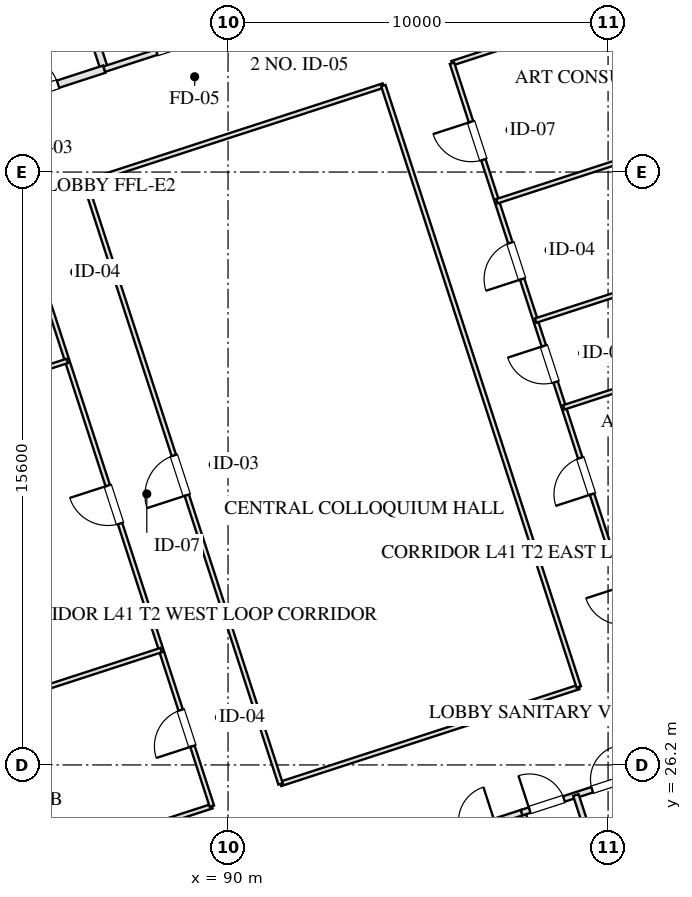
"""IFC4 building model, lengths in metres.
Left out: names, types, materials, properties, quantities, classifications, styles, units other than length and angle.
Written with IfcOpenShell. Run it as: python <this file> out.ifc"""

import sys

from ifc_helpers import new_model, si_unit, direction, frame, frame_2d, origin, place, context, subcontext, project, spatial, rectangle, extrude, element, fill, save


model = new_model("IFC4")
c1 = context("Model", 3, precision=1e-05, world=origin(), true_north=direction((0.0, 1.0)))
c2 = subcontext(c1, "Body", "Model", "MODEL_VIEW")
j1 = project(units=[si_unit("LENGTHUNIT", "METRE"), si_unit("PLANEANGLEUNIT", "RADIAN")], contexts=[c1])
p1 = place(None, origin())
s1 = spatial("IfcSite", under=j1, at=p1, CompositionType="ELEMENT")
p2 = place(p1, origin())
s2 = spatial("IfcBuilding", under=s1, at=p2, CompositionType="ELEMENT")
p3 = place(p2, frame((0.0, 0.0, 156.4)))
s3 = spatial("IfcBuildingStorey", under=s2, at=p3, CompositionType="ELEMENT", Elevation=156.4)
p4 = place(p3, frame((98.224, 59.173, 0.0), z_axis=(0.0, 0.0, 1.0), x_axis=(0.309014228706, -0.951057414911, 0.0)))
e1 = element("IfcWall", 1, at=p4, inside=s3, PredefinedType="SOLIDWALL", context=c2, shape_type="SweptSolid", body=[
    extrude(rectangle(XDim=42.8, YDim=0.4, at=frame_2d((21.4, 0.0))), origin(), (0.0, 0.0, 1.0), 2.61),
])
p5 = place(p4, frame((17.999, 0.0, 0.0)))
e2 = element("IfcOpeningElement", 2, at=p5, cuts=e1, PredefinedType="OPENING", context=c2, shape_type="SweptSolid", body=[
    extrude(rectangle(XDim=1.1, YDim=2.15, at=frame_2d((0.55, 1.075))), frame((0.0, 0.21, 0.0), z_axis=(0.0, -1.0, 0.0), x_axis=(1.0, 0.0, 0.0)), (0.0, 0.0, 1.0), 0.42),
])
p6 = place(p3, frame((97.727, 24.944, 0.0), z_axis=(0.0, 0.0, 1.0), x_axis=(0.309016001439, -0.951056838919, 0.0)))
e3 = element("IfcWall", 3, at=p6, inside=s3, PredefinedType="PARTITIONING", context=c2, shape_type="SweptSolid", body=[
    extrude(rectangle(XDim=8.43, YDim=0.2, at=frame_2d((4.215, 0.0))), origin(), (0.0, 0.0, 1.0), 3.175),
])
p7 = place(p3, frame((93.542, 23.585, 0.0), z_axis=(0.0, 0.0, 1.0), x_axis=(0.951063829732, 0.308994485023, 0.0)))
e4 = element("IfcWall", 4, at=p7, inside=s3, PredefinedType="PARTITIONING", context=c2, shape_type="SweptSolid", body=[
    extrude(rectangle(XDim=4.4, YDim=0.15, at=frame_2d((2.2, 0.0))), origin(), (0.0, 0.0, 1.0), 3.175),
])
p8 = place(p7, frame((0.55, 0.0, 0.0)))
e5 = element("IfcOpeningElement", 5, at=p8, cuts=e4, PredefinedType="OPENING", context=c2, shape_type="SweptSolid", body=[
    extrude(rectangle(XDim=0.95, YDim=2.05, at=frame_2d((0.475, 1.025))), frame((0.0, 0.085, 0.0), z_axis=(0.0, -1.0, 0.0), x_axis=(1.0, 0.0, 0.0)), (0.0, 0.0, 1.0), 0.17),
])
p9 = place(p7, frame((2.7, 0.0, 0.0)))
e6 = element("IfcOpeningElement", 6, at=p9, cuts=e4, PredefinedType="OPENING", context=c2, shape_type="SweptSolid", body=[
    extrude(rectangle(XDim=0.95, YDim=2.05, at=frame_2d((0.475, 1.025))), frame((0.0, 0.085, 0.0), z_axis=(0.0, -1.0, 0.0), x_axis=(1.0, 0.0, 0.0)), (0.0, 0.0, 1.0), 0.17),
])
p10 = place(p3, frame((97.727, 24.944, 0.0), z_axis=(0.0, 0.0, 1.0), x_axis=(0.951036872128, 0.309077446369, 0.0)))
e7 = element("IfcWall", 7, at=p10, inside=s3, PredefinedType="PARTITIONING", context=c2, shape_type="SweptSolid", body=[
    extrude(rectangle(XDim=3.2, YDim=0.15, at=frame_2d((1.6, 0.0))), origin(), (0.0, 0.0, 1.0), 3.175),
])
p11 = place(p10, frame((0.22, 0.0, 0.0)))
e8 = element("IfcOpeningElement", 8, at=p11, cuts=e7, PredefinedType="OPENING", context=c2, shape_type="SweptSolid", body=[
    extrude(rectangle(XDim=0.95, YDim=2.05, at=frame_2d((0.475, 1.025))), frame((0.0, 0.085, 0.0), z_axis=(0.0, -1.0, 0.0), x_axis=(1.0, 0.0, 0.0)), (0.0, 0.0, 1.0), 0.17),
])
p12 = place(p10, frame((1.95, 0.0, 0.0)))
e9 = element("IfcOpeningElement", 9, at=p12, cuts=e7, PredefinedType="OPENING", context=c2, shape_type="SweptSolid", body=[
    extrude(rectangle(XDim=0.9, YDim=2.05, at=frame_2d((0.45, 1.025))), frame((0.0, 0.085, 0.0), z_axis=(0.0, -1.0, 0.0), x_axis=(1.0, 0.0, 0.0)), (0.0, 0.0, 1.0), 0.17),
])
p13 = place(p3, frame((99.153, 25.408, 0.0), z_axis=(0.0, 0.0, 1.0), x_axis=(0.309016001439, -0.951056838919, 0.0)))
e10 = element("IfcWall", 10, at=p13, inside=s3, PredefinedType="PARTITIONING", context=c2, shape_type="SweptSolid", body=[
    extrude(rectangle(XDim=8.43, YDim=0.15, at=frame_2d((4.215, 0.0))), origin(), (0.0, 0.0, 1.0), 3.175),
])
p14 = place(p13, frame((2.55, 0.0, 0.0)))
e11 = element("IfcOpeningElement", 11, at=p14, cuts=e10, PredefinedType="OPENING", context=c2, shape_type="SweptSolid", body=[
    extrude(rectangle(XDim=0.95, YDim=2.05, at=frame_2d((0.475, 1.025))), frame((0.0, 0.085, 0.0), z_axis=(0.0, -1.0, 0.0), x_axis=(1.0, 0.0, 0.0)), (0.0, 0.0, 1.0), 0.17),
])
p15 = place(p13, frame((5.6, 0.0, 0.0)))
e12 = element("IfcOpeningElement", 12, at=p15, cuts=e10, PredefinedType="OPENING", context=c2, shape_type="SweptSolid", body=[
    extrude(rectangle(XDim=0.9, YDim=2.05, at=frame_2d((0.45, 1.025))), frame((0.0, 0.085, 0.0), z_axis=(0.0, -1.0, 0.0), x_axis=(1.0, 0.0, 0.0)), (0.0, 0.0, 1.0), 0.17),
])
p16 = place(p3, frame((86.743, 44.508, 0.0), z_axis=(0.0, 0.0, 1.0), x_axis=(-0.309016001439, 0.951056838919, 0.0)))
e13 = element("IfcWall", 13, at=p16, inside=s3, PredefinedType="PARTITIONING", context=c2, shape_type="SweptSolid", body=[
    extrude(rectangle(XDim=8.43, YDim=0.2, at=frame_2d((4.215, 0.0))), origin(), (0.0, 0.0, 1.0), 3.175),
])
p17 = place(p3, frame((83.101, 43.324, 0.0), z_axis=(0.0, 0.0, 1.0), x_axis=(0.951052804469, 0.309028417967, 0.0)))
e14 = element("IfcWall", 14, at=p17, inside=s3, PredefinedType="PARTITIONING", context=c2, shape_type="SweptSolid", body=[
    extrude(rectangle(XDim=3.83, YDim=0.2, at=frame_2d((1.915, 0.0))), origin(), (0.0, 0.0, 1.0), 3.175),
])
p18 = place(p17, frame((1.35, 0.0, 0.0)))
e15 = element("IfcOpeningElement", 15, at=p18, cuts=e14, PredefinedType="OPENING", context=c2, shape_type="SweptSolid", body=[
    extrude(rectangle(XDim=1.2, YDim=2.05, at=frame_2d((0.6, 1.025))), frame((0.0, 0.11, 0.0), z_axis=(0.0, -1.0, 0.0), x_axis=(1.0, 0.0, 0.0)), (0.0, 0.0, 1.0), 0.22),
])
p19 = place(p3, frame((86.743, 44.508, 0.0), z_axis=(0.0, 0.0, 1.0), x_axis=(0.951063829732, 0.308994485023, 0.0)))
e16 = element("IfcWall", 16, at=p19, inside=s3, PredefinedType="PARTITIONING", context=c2, shape_type="SweptSolid", body=[
    extrude(rectangle(XDim=4.4, YDim=0.15, at=frame_2d((2.2, 0.0))), origin(), (0.0, 0.0, 1.0), 3.175),
])
p20 = place(p19, frame((1.45, 0.0, 0.0)))
e17 = element("IfcOpeningElement", 17, at=p20, cuts=e16, PredefinedType="OPENING", context=c2, shape_type="SweptSolid", body=[
    extrude(rectangle(XDim=1.5, YDim=2.05, at=frame_2d((0.75, 1.025))), frame((0.0, 0.085, 0.0), z_axis=(0.0, -1.0, 0.0), x_axis=(1.0, 0.0, 0.0)), (0.0, 0.0, 1.0), 0.17),
])
p21 = place(p3, frame((77.925, 21.328, 0.0), z_axis=(0.0, 0.0, 1.0), x_axis=(0.95105749975, 0.309013967595, 0.0)))
e18 = element("IfcWall", 18, at=p21, inside=s3, PredefinedType="PARTITIONING", context=c2, shape_type="SweptSolid", body=[
    extrude(rectangle(XDim=12.25, YDim=0.12, at=frame_2d((6.125, 0.0))), origin(), (0.0, 0.0, 1.0), 3.175),
])
p22 = place(p3, frame((91.382, 25.701, 0.0), z_axis=(0.0, 0.0, 1.0), x_axis=(0.951061683147, 0.309001091988, 0.0)))
e19 = element("IfcWall", 19, at=p22, inside=s3, PredefinedType="PARTITIONING", context=c2, shape_type="SweptSolid", body=[
    extrude(rectangle(XDim=8.25, YDim=0.12, at=frame_2d((4.125, 0.0))), origin(), (0.0, 0.0, 1.0), 3.175),
])
p23 = place(p3, frame((86.24, 41.527, 0.0), z_axis=(0.0, 0.0, 1.0), x_axis=(0.951058857521, 0.309009788731, 0.0)))
e20 = element("IfcWall", 20, at=p23, inside=s3, PredefinedType="PARTITIONING", context=c2, shape_type="SweptSolid", body=[
    extrude(rectangle(XDim=8.25, YDim=0.12, at=frame_2d((4.125, 0.0))), origin(), (0.0, 0.0, 1.0), 3.175),
])
p24 = place(p3, frame((95.893, 44.663, 0.0), z_axis=(0.0, 0.0, 1.0), x_axis=(0.951059735424, 0.30900708674, 0.0)))
e21 = element("IfcWall", 21, at=p24, inside=s3, PredefinedType="PARTITIONING", context=c2, shape_type="SweptSolid", body=[
    extrude(rectangle(XDim=6.5, YDim=0.12, at=frame_2d((3.25, 0.0))), origin(), (0.0, 0.0, 1.0), 3.175),
])
p25 = place(p3, frame((89.575, 25.114, 0.0), z_axis=(0.0, 0.0, 1.0), x_axis=(-0.30901773025, 0.951056277195, 0.0)))
e22 = element("IfcWall", 22, at=p25, inside=s3, PredefinedType="PARTITIONING", context=c2, shape_type="SweptSolid", body=[
    extrude(rectangle(XDim=16.64, YDim=0.12, at=frame_2d((8.32, 0.0))), origin(), (0.0, 0.0, 1.0), 3.175),
])
p26 = place(p25, frame((1.66, 0.0, 0.0)))
e23 = element("IfcOpeningElement", 23, at=p26, cuts=e22, PredefinedType="OPENING", context=c2, shape_type="SweptSolid", body=[
    extrude(rectangle(XDim=1.0, YDim=2.05, at=frame_2d((0.5, 1.025))), frame((0.0, 0.07, 0.0), z_axis=(0.0, -1.0, 0.0), x_axis=(1.0, 0.0, 0.0)), (0.0, 0.0, 1.0), 0.14),
])
p27 = place(p25, frame((7.82, 0.0, 0.0)))
e24 = element("IfcOpeningElement", 24, at=p27, cuts=e22, PredefinedType="OPENING", context=c2, shape_type="SweptSolid", body=[
    extrude(rectangle(XDim=1.05, YDim=2.05, at=frame_2d((0.525, 1.025))), frame((0.0, 0.07, 0.0), z_axis=(0.0, -1.0, 0.0), x_axis=(1.0, 0.0, 0.0)), (0.0, 0.0, 1.0), 0.14),
])
p28 = place(p25, frame((13.98, 0.0, 0.0)))
e25 = element("IfcOpeningElement", 25, at=p28, cuts=e22, PredefinedType="OPENING", context=c2, shape_type="SweptSolid", body=[
    extrude(rectangle(XDim=1.0, YDim=2.05, at=frame_2d((0.5, 1.025))), frame((0.0, 0.07, 0.0), z_axis=(0.0, -1.0, 0.0), x_axis=(1.0, 0.0, 0.0)), (0.0, 0.0, 1.0), 0.14),
])
p29 = place(p3, frame((91.382, 25.701, 0.0), z_axis=(0.0, 0.0, 1.0), x_axis=(-0.309004459387, 0.951060589068, 0.0)))
e26 = element("IfcWall", 26, at=p29, inside=s3, PredefinedType="PARTITIONING", context=c2, shape_type="SweptSolid", body=[
    extrude(rectangle(XDim=16.64, YDim=0.12, at=frame_2d((8.32, 0.0))), origin(), (0.0, 0.0, 1.0), 3.175),
])
p30 = place(p29, frame((7.987, 0.0, 0.0)))
e27 = element("IfcOpeningElement", 27, at=p30, cuts=e26, PredefinedType="OPENING", context=c2, shape_type="SweptSolid", body=[
    extrude(rectangle(XDim=1.1, YDim=2.05, at=frame_2d((0.55, 1.025))), frame((0.0, 0.07, 0.0), z_axis=(0.0, -1.0, 0.0), x_axis=(1.0, 0.0, 0.0)), (0.0, 0.0, 1.0), 0.14),
])
p31 = place(p3, frame((99.229, 28.25, 0.0), z_axis=(0.0, 0.0, 1.0), x_axis=(-0.30901773025, 0.951056277195, 0.0)))
e28 = element("IfcWall", 28, at=p31, inside=s3, PredefinedType="PARTITIONING", context=c2, shape_type="SweptSolid", body=[
    extrude(rectangle(XDim=16.64, YDim=0.12, at=frame_2d((8.32, 0.0))), origin(), (0.0, 0.0, 1.0), 3.175),
])
p32 = place(p3, frame((101.035, 28.837, 0.0), z_axis=(0.0, 0.0, 1.0), x_axis=(-0.30901773025, 0.951056277195, 0.0)))
e29 = element("IfcWall", 29, at=p32, inside=s3, PredefinedType="PARTITIONING", context=c2, shape_type="SweptSolid", body=[
    extrude(rectangle(XDim=16.64, YDim=0.12, at=frame_2d((8.32, 0.0))), origin(), (0.0, 0.0, 1.0), 3.175),
])
p33 = place(p32, frame((1.16, 0.0, 0.0)))
e30 = element("IfcOpeningElement", 30, at=p33, cuts=e29, PredefinedType="OPENING", context=c2, shape_type="SweptSolid", body=[
    extrude(rectangle(XDim=1.0, YDim=2.05, at=frame_2d((0.5, 1.025))), frame((0.0, 0.07, 0.0), z_axis=(0.0, -1.0, 0.0), x_axis=(1.0, 0.0, 0.0)), (0.0, 0.0, 1.0), 0.14),
])
p34 = place(p32, frame((4.72, 0.0, 0.0)))
e31 = element("IfcOpeningElement", 31, at=p34, cuts=e29, PredefinedType="OPENING", context=c2, shape_type="SweptSolid", body=[
    extrude(rectangle(XDim=1.0, YDim=2.05, at=frame_2d((0.5, 1.025))), frame((0.0, 0.07, 0.0), z_axis=(0.0, -1.0, 0.0), x_axis=(1.0, 0.0, 0.0)), (0.0, 0.0, 1.0), 0.14),
])
p35 = place(p32, frame((7.82, 0.0, 0.0)))
e32 = element("IfcOpeningElement", 32, at=p35, cuts=e29, PredefinedType="OPENING", context=c2, shape_type="SweptSolid", body=[
    extrude(rectangle(XDim=1.0, YDim=2.05, at=frame_2d((0.5, 1.025))), frame((0.0, 0.07, 0.0), z_axis=(0.0, -1.0, 0.0), x_axis=(1.0, 0.0, 0.0)), (0.0, 0.0, 1.0), 0.14),
])
p36 = place(p32, frame((10.671, 0.0, 0.0)))
e33 = element("IfcOpeningElement", 33, at=p36, cuts=e29, PredefinedType="OPENING", context=c2, shape_type="SweptSolid", body=[
    extrude(rectangle(XDim=1.0, YDim=2.05, at=frame_2d((0.5, 1.025))), frame((0.0, 0.07, 0.0), z_axis=(0.0, -1.0, 0.0), x_axis=(1.0, 0.0, 0.0)), (0.0, 0.0, 1.0), 0.14),
])
p37 = place(p32, frame((13.971, 0.0, 0.0)))
e34 = element("IfcOpeningElement", 34, at=p37, cuts=e29, PredefinedType="OPENING", context=c2, shape_type="SweptSolid", body=[
    extrude(rectangle(XDim=1.05, YDim=2.05, at=frame_2d((0.525, 1.025))), frame((0.0, 0.07, 0.0), z_axis=(0.0, -1.0, 0.0), x_axis=(1.0, 0.0, 0.0)), (0.0, 0.0, 1.0), 0.14),
])
for number, where, z_axis, x_axis in (
    (35, (76.59, 25.437, 0.0), (0.0, 0.0, 1.0), (0.951, 0.309, 0.0)),
    (36, (74.118, 33.045, 0.0), (0.0, 0.0, 1.0), (0.951, 0.309, 0.0)),
):
    element("IfcWall", number, at=place(p3, frame(where, z_axis=z_axis, x_axis=x_axis)), inside=s3, PredefinedType="PARTITIONING", context=c2, shape_type="SweptSolid", body=[
        extrude(rectangle(XDim=12.25, YDim=0.12, at=frame_2d((6.125, 0.0))), origin(), (0.0, 0.0, 1.0), 3.175),
    ])
for number, where, z_axis, x_axis in (
    (37, (100.01, 31.995, 0.0), (0.0, 0.0, 1.0), (0.951, 0.309, 0.0)),
    (38, (98.835, 35.609, 0.0), (0.0, 0.0, 1.0), (0.951, 0.309, 0.0)),
    (39, (98.094, 37.892, 0.0), (0.0, 0.0, 1.0), (0.951, 0.309, 0.0)),
    (40, (97.073, 41.031, 0.0), (0.0, 0.0, 1.0), (0.951, 0.309, 0.0)),
):
    element("IfcWall", number, at=place(p3, frame(where, z_axis=z_axis, x_axis=x_axis)), inside=s3, PredefinedType="PARTITIONING", context=c2, shape_type="SweptSolid", body=[
        extrude(rectangle(XDim=6.5, YDim=0.12, at=frame_2d((3.25, 0.0))), origin(), (0.0, 0.0, 1.0), 3.175),
    ])
p38 = place(p11, origin())
e41 = element("IfcDoor", 41, at=p38, inside=s3, OperationType="SINGLE_SWING_LEFT", PredefinedType="DOOR", context=c2, shape_type="SweptSolid", body=[
    extrude(rectangle(XDim=0.95, YDim=2.05, at=frame_2d((0.475, 1.025))), frame((0.0, 0.025, 0.0), z_axis=(0.0, -1.0, 0.0), x_axis=(1.0, 0.0, 0.0)), (0.0, 0.0, 1.0), 0.05),
])
fill(e8, e41)
p39 = place(p12, origin())
e42 = element("IfcDoor", 42, at=p39, inside=s3, OperationType="SINGLE_SWING_RIGHT", PredefinedType="DOOR", context=c2, shape_type="SweptSolid", body=[
    extrude(rectangle(XDim=0.9, YDim=2.05, at=frame_2d((0.45, 1.025))), frame((0.0, 0.025, 0.0), z_axis=(0.0, -1.0, 0.0), x_axis=(1.0, 0.0, 0.0)), (0.0, 0.0, 1.0), 0.05),
])
fill(e9, e42)
p40 = place(p18, origin())
e43 = element("IfcDoor", 43, at=p40, inside=s3, OperationType="SINGLE_SWING_LEFT", PredefinedType="DOOR", context=c2, shape_type="SweptSolid", body=[
    extrude(rectangle(XDim=1.2, YDim=2.05, at=frame_2d((0.6, 1.025))), frame((0.0, 0.025, 0.0), z_axis=(0.0, -1.0, 0.0), x_axis=(1.0, 0.0, 0.0)), (0.0, 0.0, 1.0), 0.05),
])
fill(e15, e43)
p41 = place(p20, origin())
e44 = element("IfcDoor", 44, at=p41, inside=s3, OperationType="SINGLE_SWING_LEFT", PredefinedType="DOOR", context=c2, shape_type="SweptSolid", body=[
    extrude(rectangle(XDim=1.5, YDim=2.05, at=frame_2d((0.75, 1.025))), frame((0.0, 0.025, 0.0), z_axis=(0.0, -1.0, 0.0), x_axis=(1.0, 0.0, 0.0)), (0.0, 0.0, 1.0), 0.05),
])
fill(e17, e44)
p42 = place(p26, origin())
e45 = element("IfcDoor", 45, at=p42, inside=s3, OperationType="SINGLE_SWING_LEFT", PredefinedType="DOOR", context=c2, shape_type="SweptSolid", body=[
    extrude(rectangle(XDim=1.0, YDim=2.05, at=frame_2d((0.5, 1.025))), frame((0.0, 0.025, 0.0), z_axis=(0.0, -1.0, 0.0), x_axis=(1.0, 0.0, 0.0)), (0.0, 0.0, 1.0), 0.05),
])
fill(e23, e45)
p43 = place(p27, origin())
e46 = element("IfcDoor", 46, at=p43, inside=s3, OperationType="SINGLE_SWING_RIGHT", PredefinedType="DOOR", context=c2, shape_type="SweptSolid", body=[
    extrude(rectangle(XDim=1.05, YDim=2.05, at=frame_2d((0.525, 1.025))), frame((0.0, 0.025, 0.0), z_axis=(0.0, -1.0, 0.0), x_axis=(1.0, 0.0, 0.0)), (0.0, 0.0, 1.0), 0.05),
])
fill(e24, e46)
p44 = place(p30, origin())
e47 = element("IfcDoor", 47, at=p44, inside=s3, OperationType="SINGLE_SWING_LEFT", PredefinedType="DOOR", context=c2, shape_type="SweptSolid", body=[
    extrude(rectangle(XDim=1.1, YDim=2.05, at=frame_2d((0.55, 1.025))), frame((0.0, 0.025, 0.0), z_axis=(0.0, -1.0, 0.0), x_axis=(1.0, 0.0, 0.0)), (0.0, 0.0, 1.0), 0.05),
])
fill(e27, e47)
p45 = place(p34, origin())
e48 = element("IfcDoor", 48, at=p45, inside=s3, OperationType="SINGLE_SWING_LEFT", PredefinedType="DOOR", context=c2, shape_type="SweptSolid", body=[
    extrude(rectangle(XDim=1.0, YDim=2.05, at=frame_2d((0.5, 1.025))), frame((0.0, 0.025, 0.0), z_axis=(0.0, -1.0, 0.0), x_axis=(1.0, 0.0, 0.0)), (0.0, 0.0, 1.0), 0.05),
])
fill(e31, e48)
p46 = place(p35, origin())
e49 = element("IfcDoor", 49, at=p46, inside=s3, OperationType="SINGLE_SWING_RIGHT", PredefinedType="DOOR", context=c2, shape_type="SweptSolid", body=[
    extrude(rectangle(XDim=1.0, YDim=2.05, at=frame_2d((0.5, 1.025))), frame((0.0, 0.025, 0.0), z_axis=(0.0, -1.0, 0.0), x_axis=(1.0, 0.0, 0.0)), (0.0, 0.0, 1.0), 0.05),
])
fill(e32, e49)
p47 = place(p36, origin())
e50 = element("IfcDoor", 50, at=p47, inside=s3, OperationType="SINGLE_SWING_LEFT", PredefinedType="DOOR", context=c2, shape_type="SweptSolid", body=[
    extrude(rectangle(XDim=1.0, YDim=2.05, at=frame_2d((0.5, 1.025))), frame((0.0, 0.025, 0.0), z_axis=(0.0, -1.0, 0.0), x_axis=(1.0, 0.0, 0.0)), (0.0, 0.0, 1.0), 0.05),
])
fill(e33, e50)
p48 = place(p37, origin())
e51 = element("IfcDoor", 51, at=p48, inside=s3, OperationType="SINGLE_SWING_RIGHT", PredefinedType="DOOR", context=c2, shape_type="SweptSolid", body=[
    extrude(rectangle(XDim=1.05, YDim=2.05, at=frame_2d((0.525, 1.025))), frame((0.0, 0.025, 0.0), z_axis=(0.0, -1.0, 0.0), x_axis=(1.0, 0.0, 0.0)), (0.0, 0.0, 1.0), 0.05),
])
fill(e34, e51)
save(model, sys.argv[1])
